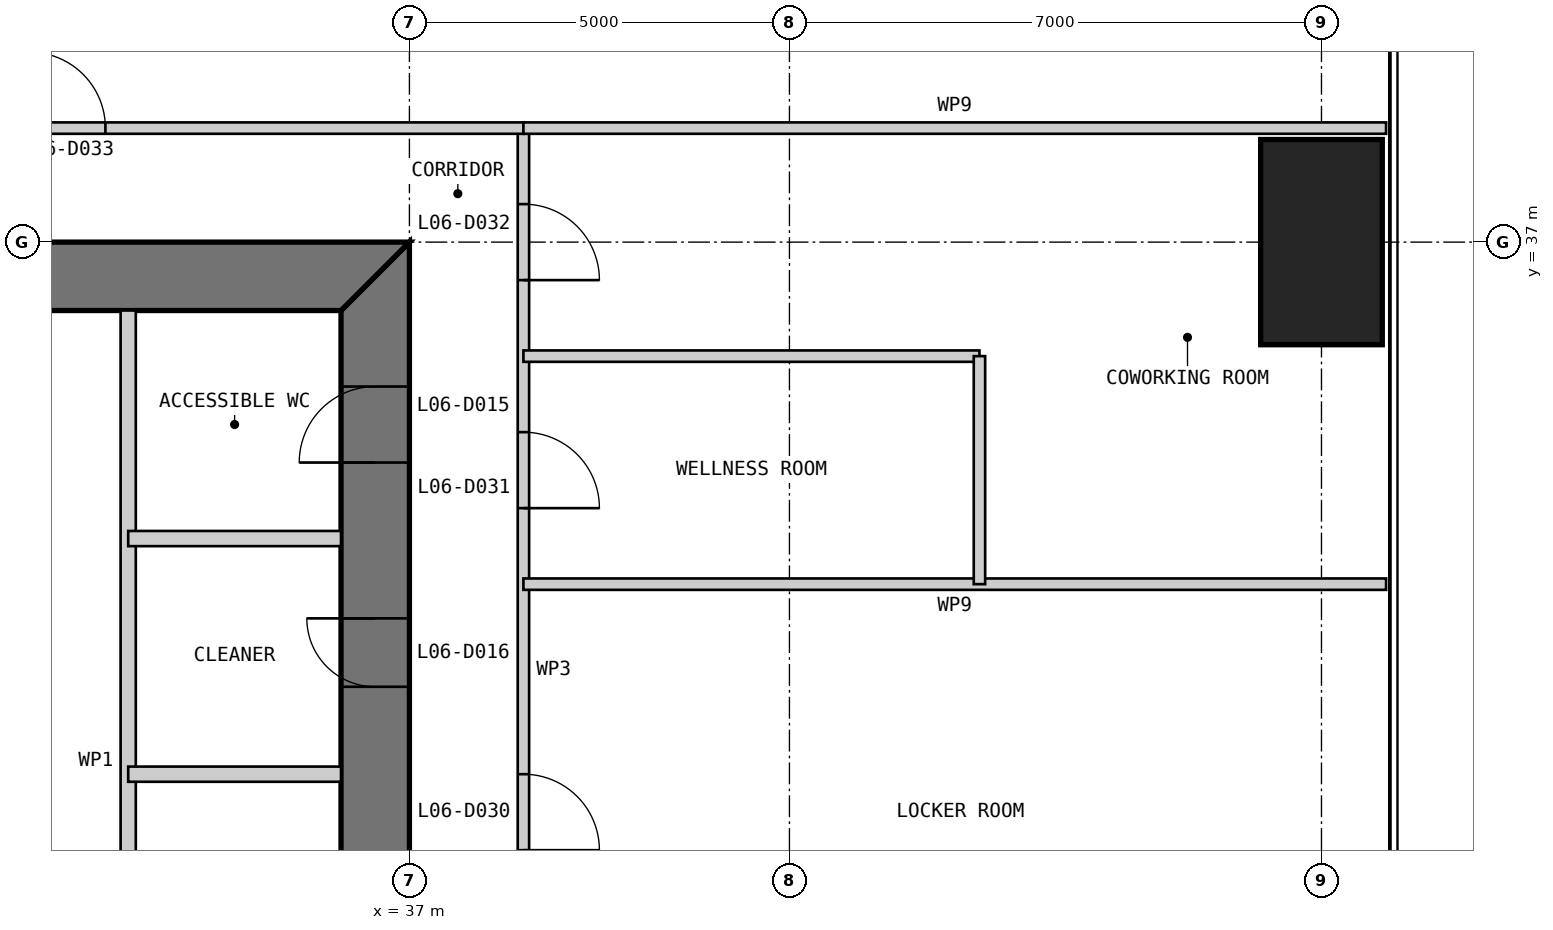
"""IFC4 building model, lengths in metres.
Left out: names, types, materials, properties, quantities, classifications, styles, units other than length and angle.
Written with IfcOpenShell. Run it as: python <this file> out.ifc"""

import sys

from ifc_helpers import new_model, si_unit, direction, frame, frame_2d, origin, origin_2d, place, context, subcontext, project, spatial, polyline, rectangle, outline, extrude, element, fill, save


model = new_model("IFC4")
c1 = context("Model", 3, precision=1e-05, world=origin(), true_north=direction((0.0, 1.0)))
c2 = subcontext(c1, "Body", "Model", "MODEL_VIEW")
j1 = project(units=[si_unit("LENGTHUNIT", "METRE"), si_unit("PLANEANGLEUNIT", "RADIAN")], contexts=[c1])
p1 = place(None, origin())
s1 = spatial("IfcSite", under=j1, at=p1, CompositionType="ELEMENT")
p2 = place(p1, origin())
s2 = spatial("IfcBuilding", under=s1, at=p2, CompositionType="ELEMENT")
p3 = place(p2, frame((0.0, 0.0, 31.0)))
s3 = spatial("IfcBuildingStorey", under=s2, at=p3, CompositionType="ELEMENT", Elevation=31.0)
p4 = place(p3, frame((49.0, 37.0, 0.0), z_axis=(0.0, 0.0, 1.0), x_axis=(1.0, 0.0, 0.0)))
e1 = element("IfcColumn", 1, at=p4, inside=s3, PredefinedType="COLUMN", context=c2, shape_type="SweptSolid", body=[
    extrude(rectangle(XDim=1.6, YDim=2.7, at=origin_2d()), origin(), (0.0, 0.0, 1.0), 4.0),
])
p5 = place(p3, frame((36.55, 13.9, 0.0), z_axis=(0.0, 0.0, 1.0), x_axis=(0.0, 1.0, 0.0)))
e2 = element("IfcWall", 2, at=p5, inside=s3, PredefinedType="SHEAR", context=c2, shape_type="SweptSolid", body=[
    extrude(outline(polyline([(-0.9, -0.45), (23.1, -0.45), (22.2, 0.45), (0.0, 0.45), (-0.9, -0.45)])), origin(), (0.0, 0.0, 1.0), 4.0),
])
p6 = place(p5, frame((20.2, 0.0, 0.0)))
e3 = element("IfcOpeningElement", 3, at=p6, cuts=e2, PredefinedType="OPENING", context=c2, shape_type="SweptSolid", body=[
    extrude(rectangle(XDim=1.0, YDim=2.2, at=frame_2d((0.5, 1.1))), frame((0.0, 0.46, 0.0), z_axis=(0.0, -1.0, 0.0), x_axis=(1.0, 0.0, 0.0)), (0.0, 0.0, 1.0), 0.92),
])
p7 = place(p5, frame((17.25, 0.0, 0.0)))
e4 = element("IfcOpeningElement", 4, at=p7, cuts=e2, PredefinedType="OPENING", context=c2, shape_type="SweptSolid", body=[
    extrude(rectangle(XDim=0.9, YDim=2.2, at=frame_2d((0.45, 1.1))), frame((0.0, 0.46, 0.0), z_axis=(0.0, -1.0, 0.0), x_axis=(1.0, 0.0, 0.0)), (0.0, 0.0, 1.0), 0.92),
])
p8 = place(p3, frame((37.0, 36.55, 0.0), z_axis=(0.0, 0.0, 1.0), x_axis=(-1.0, 0.0, 0.0)))
e5 = element("IfcWall", 5, at=p8, inside=s3, PredefinedType="SHEAR", context=c2, shape_type="SweptSolid", body=[
    extrude(outline(polyline([(0.0, -0.45), (24.0, -0.45), (23.1, 0.45), (0.9, 0.45), (0.0, -0.45)])), origin(), (0.0, 0.0, 1.0), 4.0),
])
p9 = place(p8, frame((4.9, 0.0, 0.0)))
e6 = element("IfcOpeningElement", 6, at=p9, cuts=e5, PredefinedType="OPENING", context=c2, shape_type="SweptSolid", body=[
    extrude(rectangle(XDim=1.0, YDim=2.2, at=frame_2d((0.5, 1.1))), frame((0.0, 0.46, 0.0), z_axis=(0.0, -1.0, 0.0), x_axis=(1.0, 0.0, 0.0)), (0.0, 0.0, 1.0), 0.92),
])
p10 = place(p8, frame((8.9, 0.0, 0.0)))
e7 = element("IfcOpeningElement", 7, at=p10, cuts=e5, PredefinedType="OPENING", context=c2, shape_type="SweptSolid", body=[
    extrude(rectangle(XDim=1.1, YDim=2.2, at=frame_2d((0.55, 1.1))), frame((0.0, 0.46, 0.0), z_axis=(0.0, -1.0, 0.0), x_axis=(1.0, 0.0, 0.0)), (0.0, 0.0, 1.0), 0.92),
])
p11 = place(p8, frame((15.05, 0.0, 0.0)))
e8 = element("IfcOpeningElement", 8, at=p11, cuts=e5, PredefinedType="OPENING", context=c2, shape_type="SweptSolid", body=[
    extrude(rectangle(XDim=0.9, YDim=2.2, at=frame_2d((0.45, 1.1))), frame((0.0, 0.46, 0.0), z_axis=(0.0, -1.0, 0.0), x_axis=(1.0, 0.0, 0.0)), (0.0, 0.0, 1.0), 0.92),
])
p12 = place(p8, frame((17.9, 0.0, 0.0)))
e9 = element("IfcOpeningElement", 9, at=p12, cuts=e5, PredefinedType="OPENING", context=c2, shape_type="SweptSolid", body=[
    extrude(rectangle(XDim=1.0, YDim=2.2, at=frame_2d((0.5, 1.1))), frame((0.0, 0.46, 0.0), z_axis=(0.0, -1.0, 0.0), x_axis=(1.0, 0.0, 0.0)), (0.0, 0.0, 1.0), 0.92),
])
p13 = place(p8, frame((21.4, 0.0, 0.0)))
e10 = element("IfcOpeningElement", 10, at=p13, cuts=e5, PredefinedType="OPENING", context=c2, shape_type="SweptSolid", body=[
    extrude(rectangle(XDim=1.0, YDim=2.2, at=frame_2d((0.5, 1.1))), frame((0.0, 0.46, 0.0), z_axis=(0.0, -1.0, 0.0), x_axis=(1.0, 0.0, 0.0)), (0.0, 0.0, 1.0), 0.92),
])
p14 = place(p3, frame((33.3, 36.1, 0.0), z_axis=(0.0, 0.0, 1.0), x_axis=(0.0, -1.0, 0.0)))
e11 = element("IfcWall", 11, at=p14, inside=s3, PredefinedType="PARTITIONING", context=c2, shape_type="SweptSolid", body=[
    extrude(rectangle(XDim=16.1, YDim=0.2, at=frame_2d((8.05, 0.0))), origin(), (0.0, 0.0, 1.0), 3.8),
])
for number, where, z_axis, x_axis in (
    (12, (36.1, 33.1, 0.0), (0.0, 0.0, 1.0), (-1.0, 0.0, 0.0)),
    (13, (36.1, 30.0, 0.0), (0.0, 0.0, 1.0), (-1.0, 0.0, 0.0)),
):
    element("IfcWall", number, at=place(p3, frame(where, z_axis=z_axis, x_axis=x_axis)), inside=s3, PredefinedType="PARTITIONING", context=c2, shape_type="SweptSolid", body=[
        extrude(rectangle(XDim=2.8, YDim=0.2, at=frame_2d((1.4, 0.0))), origin(), (0.0, 0.0, 1.0), 3.8),
    ])
p15 = place(p3, frame((38.5, 11.5, 0.0), z_axis=(0.0, 0.0, 1.0), x_axis=(0.0, 1.0, 0.0)))
e14 = element("IfcWall", 14, at=p15, inside=s3, PredefinedType="PARTITIONING", context=c2, shape_type="SweptSolid", body=[
    extrude(rectangle(XDim=27.0, YDim=0.15, at=frame_2d((13.5, 0.0))), origin(), (0.0, 0.0, 1.0), 3.85),
])
p16 = place(p15, frame((2.5, 0.0, 0.0)))
e15 = element("IfcOpeningElement", 15, at=p16, cuts=e14, PredefinedType="OPENING", context=c2, shape_type="SweptSolid", body=[
    extrude(rectangle(XDim=1.0, YDim=2.2, at=frame_2d((0.5, 1.1))), frame((0.0, 0.085, 0.0), z_axis=(0.0, -1.0, 0.0), x_axis=(1.0, 0.0, 0.0)), (0.0, 0.0, 1.0), 0.17),
])
p17 = place(p15, frame((11.5, 0.0, 0.0)))
e16 = element("IfcOpeningElement", 16, at=p17, cuts=e14, PredefinedType="OPENING", context=c2, shape_type="SweptSolid", body=[
    extrude(rectangle(XDim=1.0, YDim=2.2, at=frame_2d((0.5, 1.1))), frame((0.0, 0.085, 0.0), z_axis=(0.0, -1.0, 0.0), x_axis=(1.0, 0.0, 0.0)), (0.0, 0.0, 1.0), 0.17),
])
p18 = place(p15, frame((17.5, 0.0, 0.0)))
e17 = element("IfcOpeningElement", 17, at=p18, cuts=e14, PredefinedType="OPENING", context=c2, shape_type="SweptSolid", body=[
    extrude(rectangle(XDim=1.0, YDim=2.2, at=frame_2d((0.5, 1.1))), frame((0.0, 0.085, 0.0), z_axis=(0.0, -1.0, 0.0), x_axis=(1.0, 0.0, 0.0)), (0.0, 0.0, 1.0), 0.17),
])
p19 = place(p15, frame((22.0, 0.0, 0.0)))
e18 = element("IfcOpeningElement", 18, at=p19, cuts=e14, PredefinedType="OPENING", context=c2, shape_type="SweptSolid", body=[
    extrude(rectangle(XDim=1.0, YDim=2.2, at=frame_2d((0.5, 1.1))), frame((0.0, 0.085, 0.0), z_axis=(0.0, -1.0, 0.0), x_axis=(1.0, 0.0, 0.0)), (0.0, 0.0, 1.0), 0.17),
])
p20 = place(p15, frame((25.0, 0.0, 0.0)))
e19 = element("IfcOpeningElement", 19, at=p20, cuts=e14, PredefinedType="OPENING", context=c2, shape_type="SweptSolid", body=[
    extrude(rectangle(XDim=1.0, YDim=2.2, at=frame_2d((0.5, 1.1))), frame((0.0, 0.085, 0.0), z_axis=(0.0, -1.0, 0.0), x_axis=(1.0, 0.0, 0.0)), (0.0, 0.0, 1.0), 0.17),
])
p21 = place(p3, frame((49.85, 32.5, 0.0), z_axis=(0.0, 0.0, 1.0), x_axis=(-1.0, 0.0, 0.0)))
e20 = element("IfcWall", 20, at=p21, inside=s3, PredefinedType="PARTITIONING", context=c2, shape_type="SweptSolid", body=[
    extrude(rectangle(XDim=11.35, YDim=0.15, at=frame_2d((5.675, 0.0))), origin(), (0.0, 0.0, 1.0), 3.85),
])
p22 = place(p3, frame((44.5, 35.5, 0.0), z_axis=(0.0, 0.0, 1.0), x_axis=(-1.0, 0.0, 0.0)))
e21 = element("IfcWall", 21, at=p22, inside=s3, PredefinedType="PARTITIONING", context=c2, shape_type="SweptSolid", body=[
    extrude(rectangle(XDim=6.0, YDim=0.15, at=frame_2d((3.0, 0.0))), origin(), (0.0, 0.0, 1.0), 3.85),
])
p23 = place(p3, frame((44.5, 32.5, 0.0), z_axis=(0.0, 0.0, 1.0), x_axis=(0.0, 1.0, 0.0)))
e22 = element("IfcWall", 22, at=p23, inside=s3, PredefinedType="PARTITIONING", context=c2, shape_type="SweptSolid", body=[
    extrude(rectangle(XDim=3.0, YDim=0.15, at=frame_2d((1.5, 0.0))), origin(), (0.0, 0.0, 1.0), 3.85),
])
p24 = place(p3, frame((38.5, 38.5, 0.0), z_axis=(0.0, 0.0, 1.0), x_axis=(-1.0, 0.0, 0.0)))
e23 = element("IfcWall", 23, at=p24, inside=s3, PredefinedType="PARTITIONING", context=c2, shape_type="SweptSolid", body=[
    extrude(rectangle(XDim=27.0, YDim=0.15, at=frame_2d((13.5, 0.0))), origin(), (0.0, 0.0, 1.0), 3.85),
])
p25 = place(p24, frame((5.5, 0.0, 0.0)))
e24 = element("IfcOpeningElement", 24, at=p25, cuts=e23, PredefinedType="OPENING", context=c2, shape_type="SweptSolid", body=[
    extrude(rectangle(XDim=1.0, YDim=2.2, at=frame_2d((0.5, 1.1))), frame((0.0, 0.085, 0.0), z_axis=(0.0, -1.0, 0.0), x_axis=(1.0, 0.0, 0.0)), (0.0, 0.0, 1.0), 0.17),
])
p26 = place(p24, frame((17.5, 0.0, 0.0)))
e25 = element("IfcOpeningElement", 25, at=p26, cuts=e23, PredefinedType="OPENING", context=c2, shape_type="SweptSolid", body=[
    extrude(rectangle(XDim=1.0, YDim=2.2, at=frame_2d((0.5, 1.1))), frame((0.0, 0.085, 0.0), z_axis=(0.0, -1.0, 0.0), x_axis=(1.0, 0.0, 0.0)), (0.0, 0.0, 1.0), 0.17),
])
p27 = place(p24, frame((23.5, 0.0, 0.0)))
e26 = element("IfcOpeningElement", 26, at=p27, cuts=e23, PredefinedType="OPENING", context=c2, shape_type="SweptSolid", body=[
    extrude(rectangle(XDim=1.0, YDim=2.2, at=frame_2d((0.5, 1.1))), frame((0.0, 0.085, 0.0), z_axis=(0.0, -1.0, 0.0), x_axis=(1.0, 0.0, 0.0)), (0.0, 0.0, 1.0), 0.17),
])
p28 = place(p3, frame((49.85, 38.5, 0.0), z_axis=(0.0, 0.0, 1.0), x_axis=(-1.0, 0.0, 0.0)))
e27 = element("IfcWall", 27, at=p28, inside=s3, PredefinedType="PARTITIONING", context=c2, shape_type="SweptSolid", body=[
    extrude(rectangle(XDim=11.35, YDim=0.15, at=frame_2d((5.675, 0.0))), origin(), (0.0, 0.0, 1.0), 3.85),
])
p29 = place(p6, origin())
e28 = element("IfcDoor", 28, at=p29, inside=s3, OperationType="SINGLE_SWING_LEFT", PredefinedType="DOOR", context=c2, shape_type="SweptSolid", body=[
    extrude(rectangle(XDim=1.0, YDim=2.2, at=frame_2d((0.5, 1.1))), frame((0.0, 0.025, 0.0), z_axis=(0.0, -1.0, 0.0), x_axis=(1.0, 0.0, 0.0)), (0.0, 0.0, 1.0), 0.05),
    extrude(outline(polyline([(0.0, 0.0), (0.04, 0.0), (0.04, 2.16), (0.96, 2.16), (0.96, 0.0), (1.0, 0.0), (1.0, 2.2), (0.0, 2.2), (0.0, 0.0)])), frame((0.0, 0.3, 0.0), z_axis=(0.0, -1.0, 0.0), x_axis=(1.0, 0.0, 0.0)), (0.0, 0.0, 1.0), 0.6),
])
fill(e3, e28)
p30 = place(p7, origin())
e29 = element("IfcDoor", 29, at=p30, inside=s3, OperationType="SINGLE_SWING_RIGHT", PredefinedType="DOOR", context=c2, shape_type="SweptSolid", body=[
    extrude(rectangle(XDim=0.9, YDim=2.2, at=frame_2d((0.45, 1.1))), frame((0.0, 0.025, 0.0), z_axis=(0.0, -1.0, 0.0), x_axis=(1.0, 0.0, 0.0)), (0.0, 0.0, 1.0), 0.05),
    extrude(outline(polyline([(0.0, 0.0), (0.04, 0.0), (0.04, 2.16), (0.86, 2.16), (0.86, 0.0), (0.9, 0.0), (0.9, 2.2), (0.0, 2.2), (0.0, 0.0)])), frame((0.0, 0.3, 0.0), z_axis=(0.0, -1.0, 0.0), x_axis=(1.0, 0.0, 0.0)), (0.0, 0.0, 1.0), 0.6),
])
fill(e4, e29)
p31 = place(p18, frame((1.0, 0.0, 0.0), z_axis=(0.0, 0.0, 1.0), x_axis=(-1.0, 0.0, 0.0)))
e30 = element("IfcDoor", 30, at=p31, inside=s3, OperationType="SINGLE_SWING_RIGHT", PredefinedType="DOOR", context=c2, shape_type="SweptSolid", body=[
    extrude(rectangle(XDim=1.0, YDim=2.2, at=frame_2d((0.5, 1.1))), frame((0.0, 0.025, 0.0), z_axis=(0.0, -1.0, 0.0), x_axis=(1.0, 0.0, 0.0)), (0.0, 0.0, 1.0), 0.05),
])
fill(e17, e30)
p32 = place(p19, frame((1.0, 0.0, 0.0), z_axis=(0.0, 0.0, 1.0), x_axis=(-1.0, 0.0, 0.0)))
e31 = element("IfcDoor", 31, at=p32, inside=s3, OperationType="SINGLE_SWING_RIGHT", PredefinedType="DOOR", context=c2, shape_type="SweptSolid", body=[
    extrude(rectangle(XDim=1.0, YDim=2.2, at=frame_2d((0.5, 1.1))), frame((0.0, 0.025, 0.0), z_axis=(0.0, -1.0, 0.0), x_axis=(1.0, 0.0, 0.0)), (0.0, 0.0, 1.0), 0.05),
])
fill(e18, e31)
p33 = place(p20, frame((1.0, 0.0, 0.0), z_axis=(0.0, 0.0, 1.0), x_axis=(-1.0, 0.0, 0.0)))
e32 = element("IfcDoor", 32, at=p33, inside=s3, OperationType="SINGLE_SWING_RIGHT", PredefinedType="DOOR", context=c2, shape_type="SweptSolid", body=[
    extrude(rectangle(XDim=1.0, YDim=2.2, at=frame_2d((0.5, 1.1))), frame((0.0, 0.025, 0.0), z_axis=(0.0, -1.0, 0.0), x_axis=(1.0, 0.0, 0.0)), (0.0, 0.0, 1.0), 0.05),
])
fill(e19, e32)
p34 = place(p25, frame((1.0, 0.0, 0.0), z_axis=(0.0, 0.0, 1.0), x_axis=(-1.0, 0.0, 0.0)))
e33 = element("IfcDoor", 33, at=p34, inside=s3, OperationType="SINGLE_SWING_LEFT", PredefinedType="DOOR", context=c2, shape_type="SweptSolid", body=[
    extrude(rectangle(XDim=1.0, YDim=2.2, at=frame_2d((0.5, 1.1))), frame((0.0, 0.025, 0.0), z_axis=(0.0, -1.0, 0.0), x_axis=(1.0, 0.0, 0.0)), (0.0, 0.0, 1.0), 0.05),
])
fill(e24, e33)
save(model, sys.argv[1])
